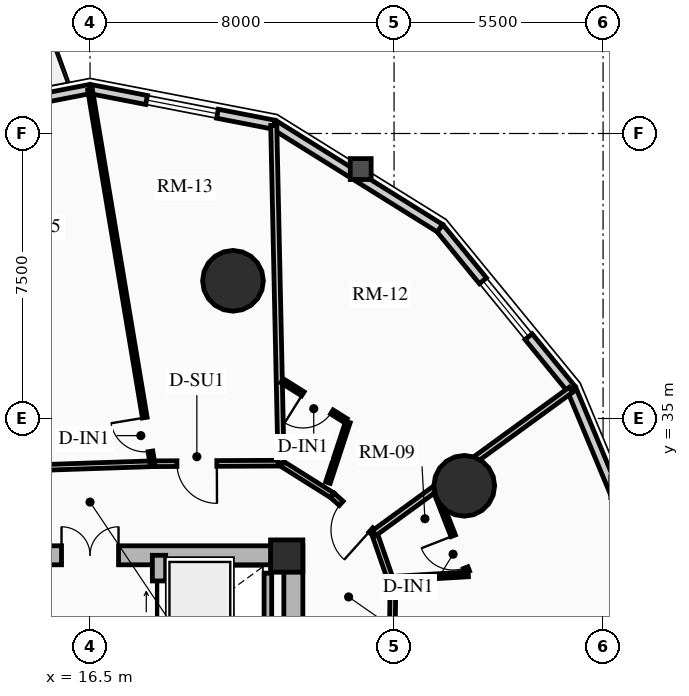
"""IFC4 building model, lengths in metres.
Left out: names, types, materials, properties, quantities, classifications, styles, units other than length and angle.
Written with IfcOpenShell. Run it as: python <this file> out.ifc"""

import sys

from ifc_helpers import new_model, si_unit, direction, frame, frame_2d, origin, origin_2d, place, context, subcontext, project, spatial, rectangle, circle, extrude, source, transform, mapped, element, fill, save


model = new_model("IFC4")
c1 = context("Model", 3, precision=1e-05, world=origin(), true_north=direction((0.0, 1.0)))
c2 = subcontext(c1, "Body", "Model", "MODEL_VIEW")
j1 = project(units=[si_unit("LENGTHUNIT", "METRE"), si_unit("PLANEANGLEUNIT", "RADIAN")], contexts=[c1])
p1 = place(None, origin())
s1 = spatial("IfcSite", under=j1, at=p1, CompositionType="ELEMENT")
p2 = place(p1, origin())
s2 = spatial("IfcBuilding", under=s1, at=p2, CompositionType="ELEMENT")
p3 = place(p2, frame((0.0, 0.0, 51.1)))
s3 = spatial("IfcBuildingStorey", under=s2, at=p3, CompositionType="ELEMENT", Elevation=51.1)
p4 = place(p3, frame((21.85, 17.35, 0.0), z_axis=(0.0, 0.0, 1.0), x_axis=(0.0, 1.0, 0.0)))
e1 = element("IfcWall", 1, at=p4, inside=s3, PredefinedType="SHEAR", context=c2, shape_type="SweptSolid", body=[
    extrude(rectangle(XDim=14.3, YDim=0.5, at=frame_2d((7.15, 0.0))), origin(), (0.0, 0.0, 1.0), 2.91),
])
p5 = place(p3, frame((11.15, 31.4, 0.0), z_axis=(0.0, 0.0, 1.0), x_axis=(1.0, 0.0, 0.0)))
e2 = element("IfcWall", 2, at=p5, inside=s3, PredefinedType="SHEAR", context=c2, shape_type="SweptSolid", body=[
    extrude(rectangle(XDim=10.7, YDim=0.5, at=frame_2d((5.35, 0.0))), origin(), (0.0, 0.0, 1.0), 2.91),
])
m1 = source(origin(), c2, "Body", "SweptSolid", [
    extrude(rectangle(XDim=1.5, YDim=2.02, at=frame_2d((0.75, 1.01))), frame((0.0, 0.26, 0.0), z_axis=(0.0, -1.0, 0.0), x_axis=(1.0, 0.0, 0.0)), (0.0, 0.0, 1.0), 0.52),
])
p6 = place(p5, frame((4.6, 0.0, 0.0)))
e3 = element("IfcOpeningElement", 3, at=p6, cuts=e2, PredefinedType="OPENING", context=c2, shape_type="MappedRepresentation", body=[
    mapped(m1, transform((0.0, 0.0, 0.0), x_axis=(1.0, 0.0, 0.0), y_axis=(0.0, 1.0, 0.0), z_axis=(0.0, 0.0, 1.0), scale=1.0)),
])
p7 = place(p3, frame((18.315, 17.6, 0.0), z_axis=(0.0, 0.0, 1.0), x_axis=(0.0, 1.0, 0.0)))
e4 = element("IfcWall", 4, at=p7, inside=s3, PredefinedType="SHEAR", context=c2, shape_type="SweptSolid", body=[
    extrude(rectangle(XDim=13.8, YDim=0.35, at=frame_2d((6.9, 0.0))), origin(), (0.0, 0.0, 1.0), 2.91),
])
m2 = source(origin(), c2, "Body", "SweptSolid", [
    extrude(rectangle(XDim=1.1, YDim=2.015, at=frame_2d((0.55, 1.007))), frame((0.0, 0.185, 0.0), z_axis=(0.0, -1.0, 0.0), x_axis=(1.0, 0.0, 0.0)), (0.0, 0.0, 1.0), 0.37),
])
p8 = place(p7, frame((10.025, 0.0, 0.0)))
e5 = element("IfcOpeningElement", 5, at=p8, cuts=e4, PredefinedType="OPENING", context=c2, shape_type="MappedRepresentation", body=[
    mapped(m2, transform((0.0, 0.0, 0.0), x_axis=(1.0, 0.0, 0.0), y_axis=(0.0, 1.0, 0.0), z_axis=(0.0, 0.0, 1.0), scale=1.0)),
])
p9 = place(p7, frame((12.025, 0.0, 0.0)))
e6 = element("IfcOpeningElement", 6, at=p9, cuts=e4, PredefinedType="OPENING", context=c2, shape_type="MappedRepresentation", body=[
    mapped(m2, transform((0.0, 0.0, 0.0), x_axis=(1.0, 0.0, 0.0), y_axis=(0.0, 1.0, 0.0), z_axis=(0.0, 0.0, 1.0), scale=1.0)),
])
m3 = source(origin(), c2, "Body", "SweptSolid", [
    extrude(rectangle(XDim=1.15, YDim=2.02, at=frame_2d((0.575, 1.01))), frame((0.0, 0.185, 0.0), z_axis=(0.0, -1.0, 0.0), x_axis=(1.0, 0.0, 0.0)), (0.0, 0.0, 1.0), 0.37),
])
p10 = place(p7, frame((5.33, 0.0, 0.0)))
e7 = element("IfcOpeningElement", 7, at=p10, cuts=e4, PredefinedType="OPENING", context=c2, shape_type="MappedRepresentation", body=[
    mapped(m3, transform((0.0, 0.0, 0.0), x_axis=(1.0, 0.0, 0.0), y_axis=(0.0, 1.0, 0.0), z_axis=(0.0, 0.0, 1.0), scale=1.0)),
])
p11 = place(p3, frame((21.675, 31.38, 0.0), z_axis=(0.0, 0.0, 1.0), x_axis=(1.0, 0.0, 0.0)))
e8 = element("IfcColumn", 8, at=p11, inside=s3, PredefinedType="COLUMN", context=c2, shape_type="SweptSolid", body=[
    extrude(rectangle(XDim=0.85, YDim=0.85, at=origin_2d()), origin(), (0.0, 0.0, 1.0), 2.91),
])
for number, where, z_axis, x_axis in (
    (9, (26.347, 33.229, 0.0), (0.0, 0.0, 1.0), (1.0, 0.0, 0.0)),
    (10, (20.261, 38.623, 0.0), (0.0, 0.0, 1.0), (1.0, 0.0, 0.0)),
):
    element("IfcColumn", number, at=place(p3, frame(where, z_axis=z_axis, x_axis=x_axis)), inside=s3, PredefinedType="USERDEFINED", context=c2, shape_type="SweptSolid", body=[
        extrude(circle(Radius=0.8, at=origin_2d()), origin(), (0.0, 0.0, 1.0), 2.91),
    ])
p12 = place(p3, frame((29.172, 35.768, 0.0), z_axis=(0.0, 0.0, 1.0), x_axis=(0.384348836956, -0.923187939442, 0.0)))
e11 = element("IfcWall", 11, at=p12, inside=s3, PredefinedType="SOLIDWALL", context=c2, shape_type="SweptSolid", body=[
    extrude(rectangle(XDim=5.789, YDim=0.24, at=frame_2d((2.894, 0.0))), origin(), (0.0, 0.0, 1.0), 2.073),
])
p13 = place(p3, frame((25.707, 40.009, 0.0), z_axis=(0.0, 0.0, 1.0), x_axis=(0.632713287022, -0.77438614168, 0.0)))
e12 = element("IfcWall", 12, at=p13, inside=s3, PredefinedType="SOLIDWALL", context=c2, shape_type="SweptSolid", body=[
    extrude(rectangle(XDim=5.477, YDim=0.24, at=frame_2d((2.738, 0.0))), origin(), (0.0, 0.0, 1.0), 2.073),
])
m4 = source(origin(), c2, "Body", "SweptSolid", [
    extrude(rectangle(XDim=1.9, YDim=1.35, at=frame_2d((0.95, 0.675))), frame((0.0, 0.13, 0.0), z_axis=(0.0, -1.0, 0.0), x_axis=(1.0, 0.0, 0.0)), (0.0, 0.0, 1.0), 0.26),
])
p14 = place(p13, frame((1.788, 0.0, 0.65)))
e13 = element("IfcOpeningElement", 13, at=p14, cuts=e12, PredefinedType="OPENING", context=c2, shape_type="MappedRepresentation", body=[
    mapped(m4, transform((0.0, 0.0, 0.0), x_axis=(1.0, 0.0, 0.0), y_axis=(0.0, 1.0, 0.0), z_axis=(0.0, 0.0, 1.0), scale=1.0)),
])
p15 = place(p3, frame((21.34, 42.732, 0.0), z_axis=(0.0, 0.0, 1.0), x_axis=(0.848533613342, -0.529141481107, 0.0)))
e14 = element("IfcWall", 14, at=p15, inside=s3, PredefinedType="SOLIDWALL", context=c2, shape_type="SweptSolid", body=[
    extrude(rectangle(XDim=5.146, YDim=0.24, at=frame_2d((2.573, 0.0))), origin(), (0.0, 0.0, 1.0), 2.073),
])
p16 = place(p3, frame((16.5, 43.67, 0.0), z_axis=(0.0, 0.0, 1.0), x_axis=(0.981725274071, -0.190303668512, 0.0)))
e15 = element("IfcWall", 15, at=p16, inside=s3, PredefinedType="SOLIDWALL", context=c2, shape_type="SweptSolid", body=[
    extrude(rectangle(XDim=4.93, YDim=0.24, at=frame_2d((2.465, 0.0))), origin(), (0.0, 0.0, 1.0), 2.073),
])
p17 = place(p16, frame((1.515, 0.0, 0.65)))
e16 = element("IfcOpeningElement", 16, at=p17, cuts=e15, PredefinedType="OPENING", context=c2, shape_type="MappedRepresentation", body=[
    mapped(m4, transform((0.0, 0.0, 0.0), x_axis=(1.0, 0.0, 0.0), y_axis=(0.0, 1.0, 0.0), z_axis=(0.0, 0.0, 1.0), scale=1.0)),
])
p18 = place(p3, frame((11.66, 42.732, 0.0), z_axis=(0.0, 0.0, 1.0), x_axis=(0.981725274071, 0.190303668512, 0.0)))
e17 = element("IfcWall", 17, at=p18, inside=s3, PredefinedType="SOLIDWALL", context=c2, shape_type="SweptSolid", body=[
    extrude(rectangle(XDim=4.93, YDim=0.24, at=frame_2d((2.465, 0.0))), origin(), (0.0, 0.0, 1.0), 2.073),
])
m5 = source(origin(), c2, "Body", "SweptSolid", [
    extrude(rectangle(XDim=1.15, YDim=2.005, at=frame_2d((0.575, 1.002))), frame((0.0, 0.13, 0.0), z_axis=(0.0, -1.0, 0.0), x_axis=(1.0, 0.0, 0.0)), (0.0, 0.0, 1.0), 0.26),
])
p19 = place(p18, frame((1.89, 0.0, 0.0)))
e18 = element("IfcOpeningElement", 18, at=p19, cuts=e17, PredefinedType="OPENING", context=c2, shape_type="MappedRepresentation", body=[
    mapped(m5, transform((0.0, 0.0, 0.0), x_axis=(1.0, 0.0, 0.0), y_axis=(0.0, 1.0, 0.0), z_axis=(0.0, 0.0, 1.0), scale=1.0)),
])
p20 = place(p3, frame((21.18, 29.295, 0.0), z_axis=(0.0, 0.0, 1.0), x_axis=(0.0, 1.0, 0.0)))
e19 = element("IfcWall", 19, at=p20, inside=s3, PredefinedType="SHEAR", context=c2, shape_type="SweptSolid", body=[
    extrude(rectangle(XDim=1.635, YDim=0.2, at=frame_2d((0.817, 0.0))), origin(), (0.0, 0.0, 1.0), 2.91),
])
p21 = place(p3, frame((24.4, 24.5, 0.0), z_axis=(0.0, 0.0, 1.0), x_axis=(0.011359710161, 0.999935476411, 0.0)))
e20 = element("IfcWall", 20, at=p21, inside=s3, PredefinedType="PARTITIONING", context=c2, shape_type="SweptSolid", body=[
    extrude(rectangle(XDim=6.082, YDim=0.15, at=frame_2d((3.041, 0.0))), origin(), (0.0, 0.0, 1.0), 2.159),
])
m6 = source(origin(), c2, "Body", "SweptSolid", [
    extrude(rectangle(XDim=1.05, YDim=2.015, at=frame_2d((0.525, 1.007))), frame((0.0, 0.085, 0.0), z_axis=(0.0, -1.0, 0.0), x_axis=(1.0, 0.0, 0.0)), (0.0, 0.0, 1.0), 0.17),
])
p22 = place(p21, frame((2.516, 0.0, 0.0)))
e21 = element("IfcOpeningElement", 21, at=p22, cuts=e20, PredefinedType="OPENING", context=c2, shape_type="MappedRepresentation", body=[
    mapped(m6, transform((0.0, 0.0, 0.0), x_axis=(1.0, 0.0, 0.0), y_axis=(0.0, 1.0, 0.0), z_axis=(0.0, 0.0, 1.0), scale=1.0)),
])
p23 = place(p3, frame((24.469, 30.582, 0.0), z_axis=(0.0, 0.0, 1.0), x_axis=(-0.328902536986, 0.944363871166, 0.0)))
e22 = element("IfcWall", 22, at=p23, inside=s3, PredefinedType="PARTITIONING", context=c2, shape_type="SweptSolid", body=[
    extrude(rectangle(XDim=1.488, YDim=0.15, at=frame_2d((0.744, 0.0))), origin(), (0.0, 0.0, 1.0), 2.205),
])
p24 = place(p3, frame((23.98, 31.987, 0.0), z_axis=(0.0, 0.0, 1.0), x_axis=(-0.744317922268, 0.667825449193, 0.0)))
e23 = element("IfcWall", 23, at=p24, inside=s3, PredefinedType="PARTITIONING", context=c2, shape_type="SweptSolid", body=[
    extrude(rectangle(XDim=1.481, YDim=0.15, at=frame_2d((0.74, 0.0))), origin(), (0.0, 0.0, 1.0), 2.159),
])
p25 = place(p24, frame((0.12, 0.0, 0.0)))
e24 = element("IfcOpeningElement", 24, at=p25, cuts=e23, PredefinedType="OPENING", context=c2, shape_type="MappedRepresentation", body=[
    mapped(m6, transform((0.0, 0.0, 0.0), x_axis=(1.0, 0.0, 0.0), y_axis=(0.0, 1.0, 0.0), z_axis=(0.0, 0.0, 1.0), scale=1.0)),
])
p26 = place(p3, frame((22.877, 32.976, 0.0), z_axis=(0.0, 0.0, 1.0), x_axis=(-0.846723232687, 0.532033614754, 0.0)))
e25 = element("IfcWall", 25, at=p26, inside=s3, PredefinedType="PARTITIONING", context=c2, shape_type="SweptSolid", body=[
    extrude(rectangle(XDim=1.595, YDim=0.15, at=frame_2d((0.797, 0.0))), origin(), (0.0, 0.0, 1.0), 2.205),
])
p27 = place(p3, frame((21.527, 33.824, 0.0), z_axis=(0.0, 0.0, 1.0), x_axis=(-0.999990631344, -0.00432865146, 0.0)))
e26 = element("IfcWall", 26, at=p27, inside=s3, PredefinedType="PARTITIONING", context=c2, shape_type="SweptSolid", body=[
    extrude(rectangle(XDim=3.384, YDim=0.15, at=frame_2d((1.692, 0.0))), origin(), (0.0, 0.0, 1.0), 2.159),
])
p28 = place(p27, frame((1.69, 0.0, 0.0)))
e27 = element("IfcOpeningElement", 27, at=p28, cuts=e26, PredefinedType="OPENING", context=c2, shape_type="MappedRepresentation", body=[
    mapped(m6, transform((0.0, 0.0, 0.0), x_axis=(1.0, 0.0, 0.0), y_axis=(0.0, 1.0, 0.0), z_axis=(0.0, 0.0, 1.0), scale=1.0)),
])
p29 = place(p3, frame((18.143, 33.81, 0.0), z_axis=(0.0, 0.0, 1.0), x_axis=(-0.999423023908, -0.033964971394, 0.0)))
e28 = element("IfcWall", 28, at=p29, inside=s3, PredefinedType="PARTITIONING", context=c2, shape_type="SweptSolid", body=[
    extrude(rectangle(XDim=6.527, YDim=0.15, at=frame_2d((3.263, 0.0))), origin(), (0.0, 0.0, 1.0), 2.159),
])
p30 = place(p3, frame((23.98, 31.987, 0.0), z_axis=(0.0, 0.0, 1.0), x_axis=(0.80834018144, 0.588715679313, 0.0)))
e29 = element("IfcWall", 29, at=p30, inside=s3, PredefinedType="PARTITIONING", context=c2, shape_type="SweptSolid", body=[
    extrude(rectangle(XDim=6.403, YDim=0.16, at=frame_2d((3.202, 0.0))), origin(), (0.0, 0.0, 1.0), 2.073),
])
p31 = place(p3, frame((21.527, 33.824, 0.0), z_axis=(0.0, 0.0, 1.0), x_axis=(-0.021694017061, 0.999764657119, 0.0)))
e30 = element("IfcWall", 30, at=p31, inside=s3, PredefinedType="PARTITIONING", context=c2, shape_type="SweptSolid", body=[
    extrude(rectangle(XDim=8.891, YDim=0.16, at=frame_2d((4.445, 0.0))), origin(), (0.0, 0.0, 1.0), 2.073),
])
p32 = place(p3, frame((24.601, 30.79, 0.0), z_axis=(0.0, 0.0, 1.0), x_axis=(0.998323904123, 0.057873849514, 0.0)))
e31 = element("IfcWall", 31, at=p32, inside=s3, PredefinedType="PARTITIONING", context=c2, shape_type="SweptSolid", body=[
    extrude(rectangle(XDim=1.856, YDim=0.125, at=frame_2d((0.928, 0.0))), origin(), (0.0, 0.0, 1.0), 2.205),
])
p33 = place(p3, frame((26.428, 30.963, 0.0), z_axis=(0.0, 0.0, 1.0), x_axis=(-0.364149471566, 0.931340519014, 0.0)))
e32 = element("IfcWall", 32, at=p33, inside=s3, PredefinedType="PARTITIONING", context=c2, shape_type="SweptSolid", body=[
    extrude(rectangle(XDim=2.247, YDim=0.125, at=frame_2d((1.124, 0.0))), origin(), (0.0, 0.0, 1.0), 2.159),
])
m7 = source(origin(), c2, "Body", "SweptSolid", [
    extrude(rectangle(XDim=0.9, YDim=2.005, at=frame_2d((0.45, 1.002))), frame((0.0, 0.073, 0.0), z_axis=(0.0, -1.0, 0.0), x_axis=(1.0, 0.0, 0.0)), (0.0, 0.0, 1.0), 0.145),
])
p34 = place(p33, frame((0.12, 0.0, 0.0)))
e33 = element("IfcOpeningElement", 33, at=p34, cuts=e32, PredefinedType="OPENING", context=c2, shape_type="MappedRepresentation", body=[
    mapped(m7, transform((0.0, 0.0, 0.0), x_axis=(1.0, 0.0, 0.0), y_axis=(0.0, 1.0, 0.0), z_axis=(0.0, 0.0, 1.0), scale=1.0)),
])
p35 = place(p3, frame((22.76, 33.313, 0.0), z_axis=(0.0, 0.0, 1.0), x_axis=(0.312649886595, 0.949868437423, 0.0)))
e34 = element("IfcWall", 34, at=p35, inside=s3, PredefinedType="PARTITIONING", context=c2, shape_type="SweptSolid", body=[
    extrude(rectangle(XDim=1.68, YDim=0.125, at=frame_2d((0.84, 0.0))), origin(), (0.0, 0.0, 1.0), 2.205),
])
p36 = place(p3, frame((23.233, 34.941, 0.0), z_axis=(0.0, 0.0, 1.0), x_axis=(-0.84760373009, 0.53062973601, 0.0)))
e35 = element("IfcWall", 35, at=p36, inside=s3, PredefinedType="PARTITIONING", context=c2, shape_type="SweptSolid", body=[
    extrude(rectangle(XDim=1.983, YDim=0.125, at=frame_2d((0.991, 0.0))), origin(), (0.0, 0.0, 1.0), 2.635),
])
p37 = place(p36, frame((0.436, 0.0, 0.0)))
e36 = element("IfcOpeningElement", 36, at=p37, cuts=e35, PredefinedType="OPENING", context=c2, shape_type="MappedRepresentation", body=[
    mapped(m7, transform((0.0, 0.0, 0.0), x_axis=(1.0, 0.0, 0.0), y_axis=(0.0, 1.0, 0.0), z_axis=(0.0, 0.0, 1.0), scale=1.0)),
])
p38 = place(p3, frame((18.143, 33.81, 0.0), z_axis=(0.0, 0.0, 1.0), x_axis=(-0.164668829219, 0.986348912243, 0.0)))
e37 = element("IfcWall", 37, at=p38, inside=s3, PredefinedType="PARTITIONING", context=c2, shape_type="SweptSolid", body=[
    extrude(rectangle(XDim=9.977, YDim=0.125, at=frame_2d((4.988, 0.0))), origin(), (0.0, 0.0, 1.0), 2.073),
])
p39 = place(p38, frame((0.33, 0.0, 0.0)))
e38 = element("IfcOpeningElement", 38, at=p39, cuts=e37, PredefinedType="OPENING", context=c2, shape_type="MappedRepresentation", body=[
    mapped(m7, transform((0.0, 0.0, 0.0), x_axis=(1.0, 0.0, 0.0), y_axis=(0.0, 1.0, 0.0), z_axis=(0.0, 0.0, 1.0), scale=1.0)),
])
m8 = source(origin(), c2, "Body", "SweptSolid", [
    extrude(rectangle(XDim=1.9, YDim=1.35, at=frame_2d((0.95, 0.675))), frame((0.0, 0.03, 0.0), z_axis=(0.0, -1.0, 0.0), x_axis=(1.0, 0.0, 0.0)), (0.0, 0.0, 1.0), 0.06),
])
p40 = place(p14, origin())
e39 = element("IfcWindow", 39, at=p40, inside=s3, PartitioningType="DOUBLE_PANEL_VERTICAL", PredefinedType="WINDOW", context=c2, shape_type="MappedRepresentation", body=[
    mapped(m8, transform((0.0, 0.0, 0.0), x_axis=(1.0, 0.0, 0.0), y_axis=(0.0, 1.0, 0.0), z_axis=(0.0, 0.0, 1.0), scale=1.0)),
])
fill(e13, e39)
p41 = place(p17, origin())
e40 = element("IfcWindow", 40, at=p41, inside=s3, PartitioningType="DOUBLE_PANEL_VERTICAL", PredefinedType="WINDOW", context=c2, shape_type="MappedRepresentation", body=[
    mapped(m8, transform((0.0, 0.0, 0.0), x_axis=(1.0, 0.0, 0.0), y_axis=(0.0, 1.0, 0.0), z_axis=(0.0, 0.0, 1.0), scale=1.0)),
])
fill(e16, e40)
m9 = source(origin(), c2, "Body", "SweptSolid", [
    extrude(rectangle(XDim=1.1, YDim=2.015, at=frame_2d((0.55, 1.007))), frame((0.0, 0.025, 0.0), z_axis=(0.0, -1.0, 0.0), x_axis=(1.0, 0.0, 0.0)), (0.0, 0.0, 1.0), 0.05),
])
p42 = place(p9, origin())
e41 = element("IfcDoor", 41, at=p42, inside=s3, OperationType="SLIDING_TO_RIGHT", PredefinedType="DOOR", context=c2, shape_type="MappedRepresentation", body=[
    mapped(m9, transform((0.0, 0.0, 0.0), x_axis=(1.0, 0.0, 0.0), y_axis=(0.0, 1.0, 0.0), z_axis=(0.0, 0.0, 1.0), scale=1.0)),
])
fill(e6, e41)
m10 = source(origin(), c2, "Body", "SweptSolid", [
    extrude(rectangle(XDim=1.5, YDim=2.02, at=frame_2d((0.75, 1.01))), frame((0.0, 0.025, 0.0), z_axis=(0.0, -1.0, 0.0), x_axis=(1.0, 0.0, 0.0)), (0.0, 0.0, 1.0), 0.05),
])
p43 = place(p6, origin())
e42 = element("IfcDoor", 42, at=p43, inside=s3, OperationType="DOUBLE_DOOR_SINGLE_SWING", PredefinedType="DOOR", context=c2, shape_type="MappedRepresentation", body=[
    mapped(m10, transform((0.0, 0.0, 0.0), x_axis=(1.0, 0.0, 0.0), y_axis=(0.0, 1.0, 0.0), z_axis=(0.0, 0.0, 1.0), scale=1.0)),
])
fill(e3, e42)
m11 = source(origin(), c2, "Body", "SweptSolid", [
    extrude(rectangle(XDim=0.9, YDim=2.005, at=frame_2d((0.45, 1.002))), frame((0.0, 0.025, 0.0), z_axis=(0.0, -1.0, 0.0), x_axis=(1.0, 0.0, 0.0)), (0.0, 0.0, 1.0), 0.05),
])
p44 = place(p34, origin())
e43 = element("IfcDoor", 43, at=p44, inside=s3, OperationType="SINGLE_SWING_RIGHT", PredefinedType="DOOR", context=c2, shape_type="MappedRepresentation", body=[
    mapped(m11, transform((0.0, 0.0, 0.0), x_axis=(1.0, 0.0, 0.0), y_axis=(0.0, 1.0, 0.0), z_axis=(0.0, 0.0, 1.0), scale=1.0)),
])
fill(e33, e43)
m12 = source(origin(), c2, "Body", "SweptSolid", [
    extrude(rectangle(XDim=1.05, YDim=2.015, at=frame_2d((0.525, 1.007))), frame((0.0, 0.025, 0.0), z_axis=(0.0, -1.0, 0.0), x_axis=(1.0, 0.0, 0.0)), (0.0, 0.0, 1.0), 0.05),
])
p45 = place(p25, origin())
e44 = element("IfcDoor", 44, at=p45, inside=s3, OperationType="SINGLE_SWING_LEFT", PredefinedType="DOOR", context=c2, shape_type="MappedRepresentation", body=[
    mapped(m12, transform((0.0, 0.0, 0.0), x_axis=(1.0, 0.0, 0.0), y_axis=(0.0, 1.0, 0.0), z_axis=(0.0, 0.0, 1.0), scale=1.0)),
])
fill(e24, e44)
p46 = place(p37, origin())
e45 = element("IfcDoor", 45, at=p46, inside=s3, OperationType="SINGLE_SWING_RIGHT", PredefinedType="DOOR", context=c2, shape_type="MappedRepresentation", body=[
    mapped(m11, transform((0.0, 0.0, 0.0), x_axis=(1.0, 0.0, 0.0), y_axis=(0.0, 1.0, 0.0), z_axis=(0.0, 0.0, 1.0), scale=1.0)),
])
fill(e36, e45)
p47 = place(p28, origin())
e46 = element("IfcDoor", 46, at=p47, inside=s3, OperationType="SINGLE_SWING_LEFT", PredefinedType="DOOR", context=c2, shape_type="MappedRepresentation", body=[
    mapped(m12, transform((0.0, 0.0, 0.0), x_axis=(1.0, 0.0, 0.0), y_axis=(0.0, 1.0, 0.0), z_axis=(0.0, 0.0, 1.0), scale=1.0)),
])
fill(e27, e46)
p48 = place(p39, origin())
e47 = element("IfcDoor", 47, at=p48, inside=s3, OperationType="SINGLE_SWING_RIGHT", PredefinedType="DOOR", context=c2, shape_type="MappedRepresentation", body=[
    mapped(m11, transform((0.0, 0.0, 0.0), x_axis=(1.0, 0.0, 0.0), y_axis=(0.0, 1.0, 0.0), z_axis=(0.0, 0.0, 1.0), scale=1.0)),
])
fill(e38, e47)
save(model, sys.argv[1])
